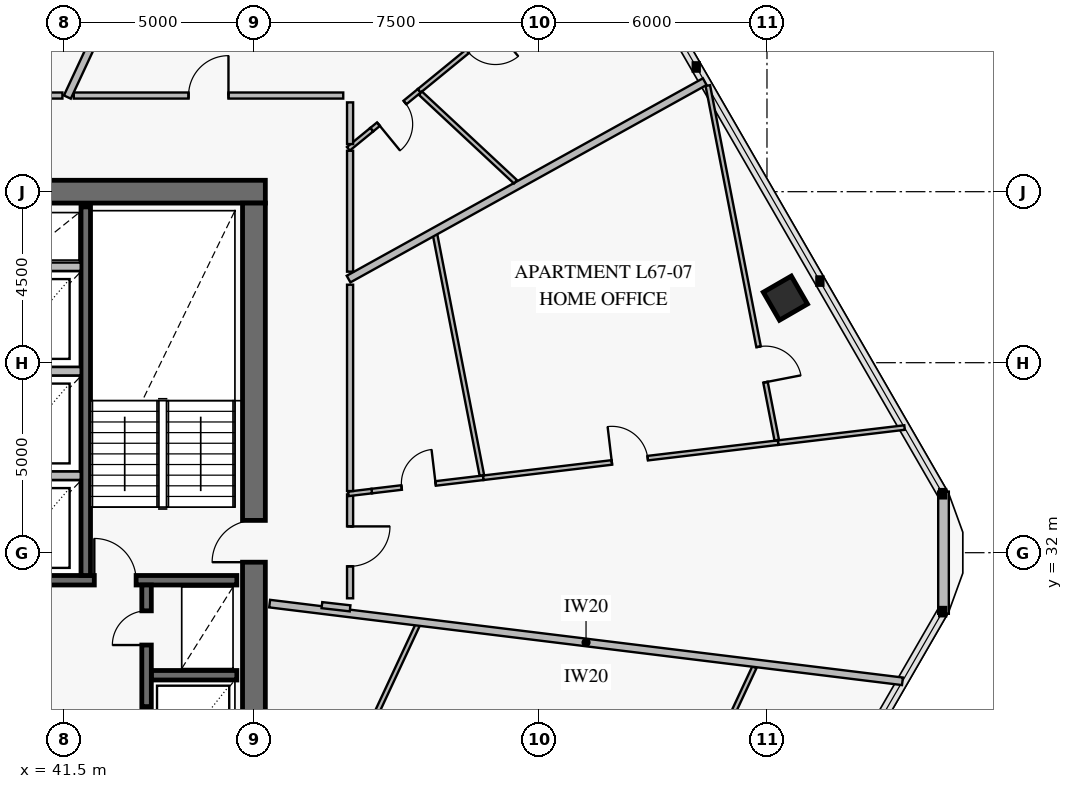
"""IFC4 building model, lengths in metres.
Left out: names, types, materials, properties, quantities, classifications, styles, units other than length and angle.
Written with IfcOpenShell. Run it as: python <this file> out.ifc"""

import sys

from ifc_helpers import new_model, si_unit, direction, frame, frame_2d, origin, origin_2d, place, context, subcontext, project, spatial, rectangle, extrude, element, fill, save


model = new_model("IFC4")
c1 = context("Model", 3, precision=1e-05, world=origin(), true_north=direction((0.0, 1.0)))
c2 = subcontext(c1, "Body", "Model", "MODEL_VIEW")
j1 = project(units=[si_unit("LENGTHUNIT", "METRE"), si_unit("PLANEANGLEUNIT", "RADIAN")], contexts=[c1])
p1 = place(None, origin())
s1 = spatial("IfcSite", under=j1, at=p1, CompositionType="ELEMENT")
p2 = place(p1, origin())
s2 = spatial("IfcBuilding", under=s1, at=p2, CompositionType="ELEMENT")
p3 = place(p2, frame((0.0, 0.0, 265.4)))
s3 = spatial("IfcBuildingStorey", under=s2, at=p3, CompositionType="ELEMENT", Elevation=265.4)
p4 = place(p3, frame((46.8, 41.5, 0.0), z_axis=(0.0, 0.0, 1.0), x_axis=(-1.0, 0.0, 0.0)))
e1 = element("IfcWall", 1, at=p4, inside=s3, PredefinedType="SHEAR", context=c2, shape_type="SweptSolid", body=[
    extrude(rectangle(XDim=7.85, YDim=0.6, at=frame_2d((3.925, 0.0))), origin(), (0.0, 0.0, 1.0), 3.8),
])
p5 = place(p3, frame((46.5, 22.8, 0.0), z_axis=(0.0, 0.0, 1.0), x_axis=(0.0, 1.0, 0.0)))
e2 = element("IfcWall", 2, at=p5, inside=s3, PredefinedType="SHEAR", context=c2, shape_type="SweptSolid", body=[
    extrude(rectangle(XDim=18.4, YDim=0.6, at=frame_2d((9.2, 0.0))), origin(), (0.0, 0.0, 1.0), 3.8),
])
p6 = place(p5, frame((8.95, 0.0, 0.0)))
e3 = element("IfcOpeningElement", 3, at=p6, cuts=e2, PredefinedType="OPENING", context=c2, shape_type="SweptSolid", body=[
    extrude(rectangle(XDim=1.1, YDim=2.15, at=frame_2d((0.55, 1.075))), frame((0.0, 0.312, 0.0), z_axis=(0.0, -1.0, 0.0), x_axis=(1.0, 0.0, 0.0)), (0.0, 0.0, 1.0), 0.624),
])
p7 = place(p3, frame((60.485, 38.699, 0.0), z_axis=(0.0, 0.0, 1.0), x_axis=(-0.5, 0.866025403784, 0.0)))
e4 = element("IfcColumn", 4, at=p7, inside=s3, PredefinedType="COLUMN", context=c2, shape_type="SweptSolid", body=[
    extrude(rectangle(XDim=0.85, YDim=0.85, at=origin_2d()), origin(), (0.0, 0.0, 1.0), 3.55),
])
p8 = place(p3, frame((64.645, 33.607, 0.0), z_axis=(0.0, 0.0, 1.0), x_axis=(0.0, -1.0, 0.0)))
e5 = element("IfcWall", 5, at=p8, inside=s3, PredefinedType="SOLIDWALL", context=c2, shape_type="SweptSolid", body=[
    extrude(rectangle(XDim=3.215, YDim=0.28, at=frame_2d((1.607, 0.0))), origin(), (0.0, 0.0, 1.0), 3.55),
])
p9 = place(p3, frame((25.95, 31.275, 0.0), z_axis=(0.0, 0.0, 1.0), x_axis=(1.0, 0.0, 0.0)))
e6 = element("IfcWall", 6, at=p9, inside=s3, PredefinedType="SOLIDWALL", context=c2, shape_type="SweptSolid", body=[
    extrude(rectangle(XDim=20.1, YDim=0.25, at=frame_2d((10.05, 0.0))), origin(), (0.0, 0.0, 1.0), 3.8),
])
p10 = place(p9, frame((2.6, 0.0, 0.0)))
e7 = element("IfcOpeningElement", 7, at=p10, cuts=e6, PredefinedType="OPENING", context=c2, shape_type="SweptSolid", body=[
    extrude(rectangle(XDim=1.1, YDim=2.15, at=frame_2d((0.55, 1.075))), frame((0.0, 0.137, 0.0), z_axis=(0.0, -1.0, 0.0), x_axis=(1.0, 0.0, 0.0)), (0.0, 0.0, 1.0), 0.274),
])
p11 = place(p9, frame((10.6, 0.0, 0.0)))
e8 = element("IfcOpeningElement", 8, at=p11, cuts=e6, PredefinedType="OPENING", context=c2, shape_type="SweptSolid", body=[
    extrude(rectangle(XDim=1.1, YDim=2.15, at=frame_2d((0.55, 1.075))), frame((0.0, 0.137, 0.0), z_axis=(0.0, -1.0, 0.0), x_axis=(1.0, 0.0, 0.0)), (0.0, 0.0, 1.0), 0.274),
])
p12 = place(p9, frame((16.35, 0.0, 0.0)))
e9 = element("IfcOpeningElement", 9, at=p12, cuts=e6, PredefinedType="OPENING", context=c2, shape_type="SweptSolid", body=[
    extrude(rectangle(XDim=1.1, YDim=2.15, at=frame_2d((0.55, 1.075))), frame((0.0, 0.137, 0.0), z_axis=(0.0, -1.0, 0.0), x_axis=(1.0, 0.0, 0.0)), (0.0, 0.0, 1.0), 0.274),
])
p13 = place(p3, frame((42.075, 31.4, 0.0), z_axis=(0.0, 0.0, 1.0), x_axis=(0.0, 1.0, 0.0)))
e10 = element("IfcWall", 10, at=p13, inside=s3, PredefinedType="SOLIDWALL", context=c2, shape_type="SweptSolid", body=[
    extrude(rectangle(XDim=9.7, YDim=0.25, at=frame_2d((4.85, 0.0))), origin(), (0.0, 0.0, 1.0), 3.8),
])
p14 = place(p3, frame((43.8, 28.775, 0.0), z_axis=(0.0, 0.0, 1.0), x_axis=(1.0, 0.0, 0.0)))
e11 = element("IfcWall", 11, at=p14, inside=s3, PredefinedType="SOLIDWALL", context=c2, shape_type="SweptSolid", body=[
    extrude(rectangle(XDim=2.25, YDim=0.25, at=frame_2d((1.125, 0.0))), origin(), (0.0, 0.0, 1.0), 3.8),
])
p15 = place(p3, frame((43.675, 22.95, 0.0), z_axis=(0.0, 0.0, 1.0), x_axis=(0.0, 1.0, 0.0)))
e12 = element("IfcWall", 12, at=p15, inside=s3, PredefinedType="SOLIDWALL", context=c2, shape_type="SweptSolid", body=[
    extrude(rectangle(XDim=8.2, YDim=0.25, at=frame_2d((4.1, 0.0))), origin(), (0.0, 0.0, 1.0), 3.8),
])
p16 = place(p15, frame((0.75, 0.0, 0.0)))
e13 = element("IfcOpeningElement", 13, at=p16, cuts=e12, PredefinedType="OPENING", context=c2, shape_type="SweptSolid", body=[
    extrude(rectangle(XDim=1.3, YDim=2.3, at=frame_2d((0.65, 1.15))), frame((0.0, 0.137, 0.0), z_axis=(0.0, -1.0, 0.0), x_axis=(1.0, 0.0, 0.0)), (0.0, 0.0, 1.0), 0.274),
])
p17 = place(p15, frame((3.7, 0.0, 0.0)))
e14 = element("IfcOpeningElement", 14, at=p17, cuts=e12, PredefinedType="OPENING", context=c2, shape_type="SweptSolid", body=[
    extrude(rectangle(XDim=1.3, YDim=2.3, at=frame_2d((0.65, 1.15))), frame((0.0, 0.137, 0.0), z_axis=(0.0, -1.0, 0.0), x_axis=(1.0, 0.0, 0.0)), (0.0, 0.0, 1.0), 0.274),
])
p18 = place(p15, frame((6.62, 0.0, 0.0)))
e15 = element("IfcOpeningElement", 15, at=p18, cuts=e12, PredefinedType="OPENING", context=c2, shape_type="SweptSolid", body=[
    extrude(rectangle(XDim=0.9, YDim=2.1, at=frame_2d((0.45, 1.05))), frame((0.0, 0.137, 0.0), z_axis=(0.0, -1.0, 0.0), x_axis=(1.0, 0.0, 0.0)), (0.0, 0.0, 1.0), 0.274),
])
p19 = place(p3, frame((55.92, 20.945, 0.0), z_axis=(0.0, 0.0, 1.0), x_axis=(0.422606705523, 0.9063131757, 0.0)))
e16 = element("IfcWall", 16, at=p19, inside=s3, PredefinedType="PARTITIONING", context=c2, shape_type="SweptSolid", body=[
    extrude(rectangle(XDim=8.871, YDim=0.12, at=frame_2d((4.435, 0.0))), origin(), (0.0, 0.0, 1.0), 2.95),
])
p20 = place(p19, frame((3.876, 0.0, 0.0)))
e17 = element("IfcOpeningElement", 17, at=p20, cuts=e16, PredefinedType="OPENING", context=c2, shape_type="SweptSolid", body=[
    extrude(rectangle(XDim=0.95, YDim=2.1, at=frame_2d((0.475, 1.05))), frame((0.0, 0.072, 0.0), z_axis=(0.0, -1.0, 0.0), x_axis=(1.0, 0.0, 0.0)), (0.0, 0.0, 1.0), 0.144),
])
p21 = place(p3, frame((49.6, 33.622, 0.0), z_axis=(0.0, 0.0, 1.0), x_axis=(0.992962166998, 0.11843198432, 0.0)))
e18 = element("IfcWall", 18, at=p21, inside=s3, PredefinedType="PARTITIONING", context=c2, shape_type="SweptSolid", body=[
    extrude(rectangle(XDim=2.956, YDim=0.12, at=frame_2d((1.478, 0.0))), origin(), (0.0, 0.0, 1.0), 3.55),
])
p22 = place(p21, frame((0.792, 0.0, 0.0)))
e19 = element("IfcOpeningElement", 19, at=p22, cuts=e18, PredefinedType="OPENING", context=c2, shape_type="SweptSolid", body=[
    extrude(rectangle(XDim=0.9, YDim=2.1, at=frame_2d((0.45, 1.05))), frame((0.0, 0.072, 0.0), z_axis=(0.0, -1.0, 0.0), x_axis=(1.0, 0.0, 0.0)), (0.0, 0.0, 1.0), 0.144),
])
p23 = place(p3, frame((52.535, 33.972, 0.0), z_axis=(0.0, 0.0, 1.0), x_axis=(0.992965116169, 0.118407255145, 0.0)))
e20 = element("IfcWall", 20, at=p23, inside=s3, PredefinedType="PARTITIONING", context=c2, shape_type="SweptSolid", body=[
    extrude(rectangle(XDim=7.814, YDim=0.12, at=frame_2d((3.907, 0.0))), origin(), (0.0, 0.0, 1.0), 3.55),
])
p24 = place(p23, frame((3.407, 0.0, 0.0)))
e21 = element("IfcOpeningElement", 21, at=p24, cuts=e20, PredefinedType="OPENING", context=c2, shape_type="SweptSolid", body=[
    extrude(rectangle(XDim=0.95, YDim=2.1, at=frame_2d((0.475, 1.05))), frame((0.0, 0.072, 0.0), z_axis=(0.0, -1.0, 0.0), x_axis=(1.0, 0.0, 0.0)), (0.0, 0.0, 1.0), 0.144),
])
p25 = place(p3, frame((60.257, 34.961, 0.0), z_axis=(0.0, 0.0, 1.0), x_axis=(-0.190833223762, 0.981622473616, 0.0)))
e22 = element("IfcWall", 22, at=p25, inside=s3, PredefinedType="PARTITIONING", context=c2, shape_type="SweptSolid", body=[
    extrude(rectangle(XDim=9.506, YDim=0.12, at=frame_2d((4.753, 0.0))), origin(), (0.0, 0.0, 1.0), 2.93),
])
p26 = place(p25, frame((1.553, 0.0, 0.0)))
e23 = element("IfcOpeningElement", 23, at=p26, cuts=e22, PredefinedType="OPENING", context=c2, shape_type="SweptSolid", body=[
    extrude(rectangle(XDim=0.95, YDim=2.1, at=frame_2d((0.475, 1.05))), frame((0.0, 0.072, 0.0), z_axis=(0.0, -1.0, 0.0), x_axis=(1.0, 0.0, 0.0)), (0.0, 0.0, 1.0), 0.144),
])
p27 = place(p3, frame((49.03, 30.8, 0.0), z_axis=(0.0, 0.0, 1.0), x_axis=(0.0, 1.0, 0.0)))
e24 = element("IfcWall", 24, at=p27, inside=s3, PredefinedType="PARTITIONING", context=c2, shape_type="SweptSolid", body=[
    extrude(rectangle(XDim=2.734, YDim=0.16, at=frame_2d((1.367, 0.0))), origin(), (0.0, 0.0, 1.0), 3.55),
])
p28 = place(p27, frame((0.842, 0.0, 0.0)))
e25 = element("IfcOpeningElement", 25, at=p28, cuts=e24, PredefinedType="OPENING", context=c2, shape_type="SweptSolid", body=[
    extrude(rectangle(XDim=1.05, YDim=2.15, at=frame_2d((0.525, 1.075))), frame((0.0, 0.092, 0.0), z_axis=(0.0, -1.0, 0.0), x_axis=(1.0, 0.0, 0.0)), (0.0, 0.0, 1.0), 0.184),
])
p29 = place(p3, frame((49.6, 43.132, 0.0), z_axis=(0.0, 0.0, 1.0), x_axis=(0.773876497014, 0.633336535635, 0.0)))
e26 = element("IfcWall", 26, at=p29, inside=s3, PredefinedType="PARTITIONING", context=c2, shape_type="SweptSolid", body=[
    extrude(rectangle(XDim=1.615, YDim=0.12, at=frame_2d((0.808, 0.0))), origin(), (0.0, 0.0, 1.0), 3.55),
])
p30 = place(p29, frame((0.229, 0.0, 0.0)))
e27 = element("IfcOpeningElement", 27, at=p30, cuts=e26, PredefinedType="OPENING", context=c2, shape_type="SweptSolid", body=[
    extrude(rectangle(XDim=0.9, YDim=2.1, at=frame_2d((0.45, 1.05))), frame((0.0, 0.072, 0.0), z_axis=(0.0, -1.0, 0.0), x_axis=(1.0, 0.0, 0.0)), (0.0, 0.0, 1.0), 0.144),
])
p31 = place(p3, frame((50.85, 44.155, 0.0), z_axis=(0.0, 0.0, 1.0), x_axis=(0.773805447129, 0.633423341844, 0.0)))
e28 = element("IfcWall", 28, at=p31, inside=s3, PredefinedType="PARTITIONING", context=c2, shape_type="SweptSolid", body=[
    extrude(rectangle(XDim=2.937, YDim=0.12, at=frame_2d((1.469, 0.0))), origin(), (0.0, 0.0, 1.0), 3.15),
])
p32 = place(p31, frame((1.641, 0.0, 0.0)))
e29 = element("IfcOpeningElement", 29, at=p32, cuts=e28, PredefinedType="OPENING", context=c2, shape_type="SweptSolid", body=[
    extrude(rectangle(XDim=0.95, YDim=2.1, at=frame_2d((0.475, 1.05))), frame((0.0, 0.072, 0.0), z_axis=(0.0, -1.0, 0.0), x_axis=(1.0, 0.0, 0.0)), (0.0, 0.0, 1.0), 0.144),
])
p33 = place(p3, frame((48.85, 44.03, 0.0), z_axis=(0.0, 0.0, 1.0), x_axis=(-1.0, 0.0, 0.0)))
e30 = element("IfcWall", 30, at=p33, inside=s3, PredefinedType="PARTITIONING", context=c2, shape_type="SweptSolid", body=[
    extrude(rectangle(XDim=7.09, YDim=0.16, at=frame_2d((3.545, 0.0))), origin(), (0.0, 0.0, 1.0), 2.95),
])
p34 = place(p33, frame((3.02, 0.0, 0.0)))
e31 = element("IfcOpeningElement", 31, at=p34, cuts=e30, PredefinedType="OPENING", context=c2, shape_type="SweptSolid", body=[
    extrude(rectangle(XDim=1.05, YDim=2.15, at=frame_2d((0.525, 1.075))), frame((0.0, 0.092, 0.0), z_axis=(0.0, -1.0, 0.0), x_axis=(1.0, 0.0, 0.0)), (0.0, 0.0, 1.0), 0.184),
])
for number, where, z_axis, x_axis in (
    (32, (39.558, 34.025, 0.0), (0.0, 0.0, 1.0), (1.0, 0.0, 0.0)),
    (33, (39.558, 36.775, 0.0), (0.0, 0.0, 1.0), (1.0, 0.0, 0.0)),
    (34, (39.558, 39.525, 0.0), (0.0, 0.0, 1.0), (1.0, 0.0, 0.0)),
):
    element("IfcWall", number, at=place(p3, frame(where, z_axis=z_axis, x_axis=x_axis)), inside=s3, PredefinedType="PARTITIONING", context=c2, shape_type="SweptSolid", body=[
        extrude(rectangle(XDim=2.384, YDim=0.22, at=frame_2d((1.192, 0.0))), origin(), (0.0, 0.0, 1.0), 3.55),
    ])
p35 = place(p3, frame((48.479, 25.104, 0.0), z_axis=(0.0, 0.0, 1.0), x_axis=(0.422623708153, 0.906305247313, 0.0)))
e35 = element("IfcWall", 35, at=p35, inside=s3, PredefinedType="PARTITIONING", context=c2, shape_type="SweptSolid", body=[
    extrude(rectangle(XDim=5.566, YDim=0.12, at=frame_2d((2.783, 0.0))), origin(), (0.0, 0.0, 1.0), 2.95),
])
p36 = place(p3, frame((46.913, 30.66, 0.0), z_axis=(0.0, 0.0, 1.0), x_axis=(0.992546420308, -0.121867155269, 0.0)))
e36 = element("IfcWall", 36, at=p36, inside=s3, PredefinedType="PARTITIONING", context=c2, shape_type="SweptSolid", body=[
    extrude(rectangle(XDim=16.776, YDim=0.2, at=frame_2d((8.388, 0.0))), origin(), (0.0, 0.0, 1.0), 2.93),
])
p37 = place(p3, frame((48.985, 33.548, 0.0), z_axis=(0.0, 0.0, 1.0), x_axis=(0.992982764492, 0.118259162107, 0.0)))
e37 = element("IfcWall", 37, at=p37, inside=s3, PredefinedType="PARTITIONING", context=c2, shape_type="SweptSolid", body=[
    extrude(rectangle(XDim=0.619, YDim=0.12, at=frame_2d((0.31, 0.0))), origin(), (0.0, 0.0, 1.0), 3.55),
])
p38 = place(p3, frame((60.295, 34.897, 0.0), z_axis=(0.0, 0.0, 1.0), x_axis=(0.992966251005, 0.118397738005, 0.0)))
e38 = element("IfcWall", 38, at=p38, inside=s3, PredefinedType="PARTITIONING", context=c2, shape_type="SweptSolid", body=[
    extrude(rectangle(XDim=3.349, YDim=0.12, at=frame_2d((1.674, 0.0))), origin(), (0.0, 0.0, 1.0), 2.93),
])
p39 = place(p3, frame((52.498, 34.036, 0.0), z_axis=(0.0, 0.0, 1.0), x_axis=(-0.190812206092, 0.981626559342, 0.0)))
e39 = element("IfcWall", 39, at=p39, inside=s3, PredefinedType="PARTITIONING", context=c2, shape_type="SweptSolid", body=[
    extrude(rectangle(XDim=6.483, YDim=0.12, at=frame_2d((3.242, 0.0))), origin(), (0.0, 0.0, 1.0), 2.95),
])
p40 = place(p3, frame((48.99, 39.2, 0.0), z_axis=(0.0, 0.0, 1.0), x_axis=(0.874612572959, 0.484822490426, 0.0)))
e40 = element("IfcWall", 40, at=p40, inside=s3, PredefinedType="PARTITIONING", context=c2, shape_type="SweptSolid", body=[
    extrude(rectangle(XDim=10.715, YDim=0.2, at=frame_2d((5.358, 0.0))), origin(), (0.0, 0.0, 1.0), 2.93),
])
p41 = place(p3, frame((48.985, 42.628, 0.0), z_axis=(0.0, 0.0, 1.0), x_axis=(0.773806724765, 0.63342178105, 0.0)))
e41 = element("IfcWall", 41, at=p41, inside=s3, PredefinedType="PARTITIONING", context=c2, shape_type="SweptSolid", body=[
    extrude(rectangle(XDim=0.795, YDim=0.12, at=frame_2d((0.397, 0.0))), origin(), (0.0, 0.0, 1.0), 3.55),
])
p42 = place(p3, frame((53.383, 41.759, 0.0), z_axis=(0.0, 0.0, 1.0), x_axis=(-0.731335264497, 0.68201813092, 0.0)))
e42 = element("IfcWall", 42, at=p42, inside=s3, PredefinedType="PARTITIONING", context=c2, shape_type="SweptSolid", body=[
    extrude(rectangle(XDim=3.421, YDim=0.12, at=frame_2d((1.71, 0.0))), origin(), (0.0, 0.0, 1.0), 3.15),
])
p43 = place(p3, frame((41.591, 43.99, 0.0), z_axis=(0.0, 0.0, 1.0), x_axis=(0.422607909104, 0.906312614479, 0.0)))
e43 = element("IfcWall", 43, at=p43, inside=s3, PredefinedType="PARTITIONING", context=c2, shape_type="SweptSolid", body=[
    extrude(rectangle(XDim=14.977, YDim=0.2, at=frame_2d((7.488, 0.0))), origin(), (0.0, 0.0, 1.0), 2.93),
])
p44 = place(p3, frame((49.03, 30.536, 0.0), z_axis=(0.0, 0.0, 1.0), x_axis=(-0.993568487463, 0.113232772287, 0.0)))
e44 = element("IfcWall", 44, at=p44, inside=s3, PredefinedType="PARTITIONING", context=c2, shape_type="SweptSolid", body=[
    extrude(rectangle(XDim=0.746, YDim=0.16, at=frame_2d((0.373, 0.0))), origin(), (0.0, 0.0, 1.0), 3.55),
])
p45 = place(p3, frame((49.03, 33.622, 0.0), z_axis=(0.0, 0.0, 1.0), x_axis=(0.0, 1.0, 0.0)))
e45 = element("IfcWall", 45, at=p45, inside=s3, PredefinedType="PARTITIONING", context=c2, shape_type="SweptSolid", body=[
    extrude(rectangle(XDim=5.43, YDim=0.16, at=frame_2d((2.715, 0.0))), origin(), (0.0, 0.0, 1.0), 2.95),
])
p46 = place(p3, frame((49.03, 42.753, 0.0), z_axis=(0.0, 0.0, 1.0), x_axis=(0.0, 1.0, 0.0)))
e46 = element("IfcWall", 46, at=p46, inside=s3, PredefinedType="PARTITIONING", context=c2, shape_type="SweptSolid", body=[
    extrude(rectangle(XDim=1.097, YDim=0.16, at=frame_2d((0.549, 0.0))), origin(), (0.0, 0.0, 1.0), 3.55),
])
p47 = place(p3, frame((49.03, 39.395, 0.0), z_axis=(0.0, 0.0, 1.0), x_axis=(0.0, 1.0, 0.0)))
e47 = element("IfcWall", 47, at=p47, inside=s3, PredefinedType="PARTITIONING", context=c2, shape_type="SweptSolid", body=[
    extrude(rectangle(XDim=3.182, YDim=0.16, at=frame_2d((1.591, 0.0))), origin(), (0.0, 0.0, 1.0), 3.55),
])
p48 = place(p3, frame((41.46, 44.03, 0.0), z_axis=(0.0, 0.0, 1.0), x_axis=(-1.0, 0.0, 0.0)))
e48 = element("IfcWall", 48, at=p48, inside=s3, PredefinedType="PARTITIONING", context=c2, shape_type="SweptSolid", body=[
    extrude(rectangle(XDim=3.009, YDim=0.16, at=frame_2d((1.504, 0.0))), origin(), (0.0, 0.0, 1.0), 2.95),
])
p49 = place(p6, origin())
e49 = element("IfcDoor", 49, at=p49, inside=s3, OperationType="SINGLE_SWING_LEFT", PredefinedType="USERDEFINED", context=c2, shape_type="SweptSolid", body=[
    extrude(rectangle(XDim=1.1, YDim=2.15, at=frame_2d((0.55, 1.075))), frame((0.0, 0.025, 0.0), z_axis=(0.0, -1.0, 0.0), x_axis=(1.0, 0.0, 0.0)), (0.0, 0.0, 1.0), 0.05),
])
fill(e3, e49)
p50 = place(p12, origin())
e50 = element("IfcDoor", 50, at=p50, inside=s3, OperationType="SINGLE_SWING_LEFT", PredefinedType="USERDEFINED", context=c2, shape_type="SweptSolid", body=[
    extrude(rectangle(XDim=1.1, YDim=2.15, at=frame_2d((0.55, 1.075))), frame((0.0, 0.025, 0.0), z_axis=(0.0, -1.0, 0.0), x_axis=(1.0, 0.0, 0.0)), (0.0, 0.0, 1.0), 0.05),
])
fill(e9, e50)
p51 = place(p17, origin())
e51 = element("IfcDoor", 51, at=p51, inside=s3, OperationType="DOUBLE_DOOR_SLIDING", PredefinedType="DOOR", context=c2, shape_type="SweptSolid", body=[
    extrude(rectangle(XDim=1.3, YDim=2.3, at=frame_2d((0.65, 1.15))), frame((0.0, 0.025, 0.0), z_axis=(0.0, -1.0, 0.0), x_axis=(1.0, 0.0, 0.0)), (0.0, 0.0, 1.0), 0.05),
])
fill(e14, e51)
p52 = place(p18, origin())
e52 = element("IfcDoor", 52, at=p52, inside=s3, OperationType="SINGLE_SWING_LEFT", PredefinedType="DOOR", context=c2, shape_type="SweptSolid", body=[
    extrude(rectangle(XDim=0.9, YDim=2.1, at=frame_2d((0.45, 1.05))), frame((0.0, 0.025, 0.0), z_axis=(0.0, -1.0, 0.0), x_axis=(1.0, 0.0, 0.0)), (0.0, 0.0, 1.0), 0.05),
])
fill(e15, e52)
p53 = place(p22, origin())
e53 = element("IfcDoor", 53, at=p53, inside=s3, OperationType="SINGLE_SWING_RIGHT", PredefinedType="DOOR", context=c2, shape_type="SweptSolid", body=[
    extrude(rectangle(XDim=0.9, YDim=2.1, at=frame_2d((0.45, 1.05))), frame((0.0, 0.025, 0.0), z_axis=(0.0, -1.0, 0.0), x_axis=(1.0, 0.0, 0.0)), (0.0, 0.0, 1.0), 0.05),
])
fill(e19, e53)
p54 = place(p24, origin())
e54 = element("IfcDoor", 54, at=p54, inside=s3, OperationType="SINGLE_SWING_LEFT", PredefinedType="DOOR", context=c2, shape_type="SweptSolid", body=[
    extrude(rectangle(XDim=0.95, YDim=2.1, at=frame_2d((0.475, 1.05))), frame((0.0, 0.025, 0.0), z_axis=(0.0, -1.0, 0.0), x_axis=(1.0, 0.0, 0.0)), (0.0, 0.0, 1.0), 0.05),
])
fill(e21, e54)
p55 = place(p26, frame((0.95, 0.0, 0.0), z_axis=(0.0, 0.0, 1.0), x_axis=(-1.0, 0.0, 0.0)))
e55 = element("IfcDoor", 55, at=p55, inside=s3, OperationType="SINGLE_SWING_RIGHT", PredefinedType="DOOR", context=c2, shape_type="SweptSolid", body=[
    extrude(rectangle(XDim=0.95, YDim=2.1, at=frame_2d((0.475, 1.05))), frame((0.0, 0.025, 0.0), z_axis=(0.0, -1.0, 0.0), x_axis=(1.0, 0.0, 0.0)), (0.0, 0.0, 1.0), 0.05),
])
fill(e23, e55)
p56 = place(p28, frame((1.05, 0.0, 0.0), z_axis=(0.0, 0.0, 1.0), x_axis=(-1.0, 0.0, 0.0)))
e56 = element("IfcDoor", 56, at=p56, inside=s3, OperationType="SINGLE_SWING_LEFT", PredefinedType="DOOR", context=c2, shape_type="SweptSolid", body=[
    extrude(rectangle(XDim=1.05, YDim=2.15, at=frame_2d((0.525, 1.075))), frame((0.0, 0.025, 0.0), z_axis=(0.0, -1.0, 0.0), x_axis=(1.0, 0.0, 0.0)), (0.0, 0.0, 1.0), 0.05),
])
fill(e25, e56)
p57 = place(p30, frame((0.9, 0.0, 0.0), z_axis=(0.0, 0.0, 1.0), x_axis=(-1.0, 0.0, 0.0)))
e57 = element("IfcDoor", 57, at=p57, inside=s3, OperationType="SINGLE_SWING_RIGHT", PredefinedType="DOOR", context=c2, shape_type="SweptSolid", body=[
    extrude(rectangle(XDim=0.9, YDim=2.1, at=frame_2d((0.45, 1.05))), frame((0.0, 0.025, 0.0), z_axis=(0.0, -1.0, 0.0), x_axis=(1.0, 0.0, 0.0)), (0.0, 0.0, 1.0), 0.05),
])
fill(e27, e57)
p58 = place(p34, frame((1.05, 0.0, 0.0), z_axis=(0.0, 0.0, 1.0), x_axis=(-1.0, 0.0, 0.0)))
e58 = element("IfcDoor", 58, at=p58, inside=s3, OperationType="SINGLE_SWING_RIGHT", PredefinedType="DOOR", context=c2, shape_type="SweptSolid", body=[
    extrude(rectangle(XDim=1.05, YDim=2.15, at=frame_2d((0.525, 1.075))), frame((0.0, 0.025, 0.0), z_axis=(0.0, -1.0, 0.0), x_axis=(1.0, 0.0, 0.0)), (0.0, 0.0, 1.0), 0.05),
])
fill(e31, e58)
save(model, sys.argv[1])
